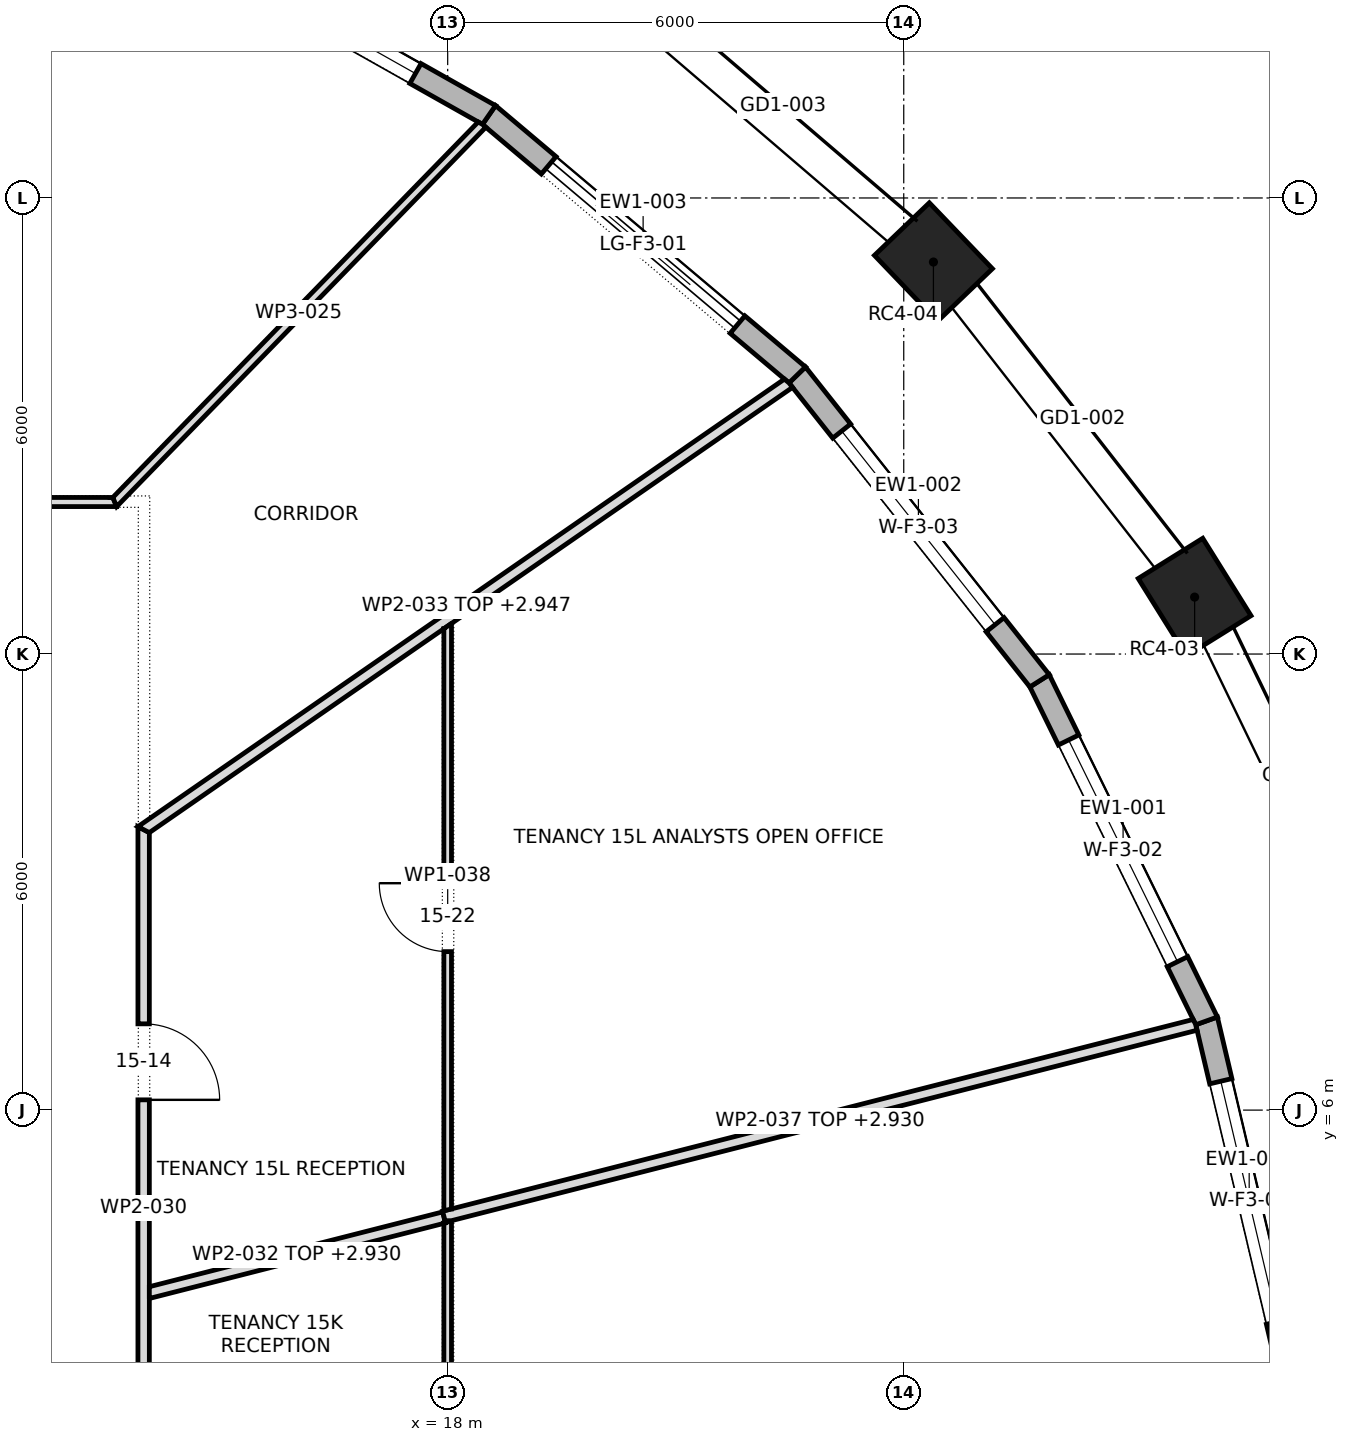
"""IFC4 building model, lengths in metres.
Left out: names, types, materials, properties, quantities, classifications, styles, units other than length and angle.
Written with IfcOpenShell. Run it as: python <this file> out.ifc"""

import sys

from ifc_helpers import new_model, si_unit, direction, frame, frame_2d, origin, origin_2d, place, context, subcontext, project, spatial, polyline, rectangle, outline, extrude, element, fill, save


model = new_model("IFC4")
c1 = context("Model", 3, precision=1e-05, world=origin(), true_north=direction((0.0, 1.0)))
c2 = subcontext(c1, "Body", "Model", "MODEL_VIEW")
j1 = project(units=[si_unit("LENGTHUNIT", "METRE"), si_unit("PLANEANGLEUNIT", "RADIAN")], contexts=[c1])
p1 = place(None, origin())
s1 = spatial("IfcSite", under=j1, at=p1, CompositionType="ELEMENT")
p2 = place(p1, origin())
s2 = spatial("IfcBuilding", under=s1, at=p2, CompositionType="ELEMENT")
p3 = place(p2, frame((0.0, 0.0, 222.9)))
s3 = spatial("IfcBuildingStorey", under=s2, at=p3, CompositionType="ELEMENT", Elevation=222.9)
for number, where, z_axis, x_axis in (
    (1, (27.827, 12.749, 0.0), (0.0, 0.0, 1.0), (-0.529, 0.849, 0.0)),
    (2, (24.39, 17.157, 0.0), (0.0, 0.0, 1.0), (-0.692, 0.722, 0.0)),
):
    element("IfcColumn", number, at=place(p3, frame(where, z_axis=z_axis, x_axis=x_axis)), inside=s3, PredefinedType="COLUMN", context=c2, shape_type="SweptSolid", body=[
        extrude(rectangle(XDim=1.2, YDim=1.0, at=origin_2d()), origin(), (0.0, 0.0, 1.0), 4.0),
    ])
p4 = place(p3, frame((29.104, 2.423, 0.0), z_axis=(0.0, 0.0, 1.0), x_axis=(-0.229546618766, 0.97329766763, 0.0)))
e3 = element("IfcWall", 3, at=p4, inside=s3, PredefinedType="STANDARD", context=c2, shape_type="SweptSolid", body=[
    extrude(outline(polyline([(-0.017, -0.15), (4.899, -0.15), (4.865, 0.15), (0.017, 0.15), (-0.017, -0.15)])), origin(), (0.0, 0.0, 1.0), 3.7),
])
p5 = place(p4, frame((0.816, 0.0, 0.6)))
e4 = element("IfcOpeningElement", 4, at=p5, cuts=e3, PredefinedType="OPENING", context=c2, shape_type="SweptSolid", body=[
    extrude(rectangle(XDim=3.25, YDim=2.65, at=frame_2d((1.625, 1.325))), frame((0.0, 0.162, 0.0), z_axis=(0.0, -1.0, 0.0), x_axis=(1.0, 0.0, 0.0)), (0.0, 0.0, 1.0), 0.324),
])
p6 = place(p3, frame((27.984, 7.174, 0.0), z_axis=(0.0, 0.0, 1.0), x_axis=(-0.440795186599, 0.897607711348, 0.0)))
e5 = element("IfcWall", 5, at=p6, inside=s3, PredefinedType="STANDARD", context=c2, shape_type="SweptSolid", body=[
    extrude(outline(polyline([(-0.017, -0.15), (5.0, -0.15), (4.968, 0.15), (0.017, 0.15), (-0.017, -0.15)])), origin(), (0.0, 0.0, 1.0), 3.7),
])
p7 = place(p6, frame((0.867, 0.0, 0.6)))
e6 = element("IfcOpeningElement", 6, at=p7, cuts=e5, PredefinedType="OPENING", context=c2, shape_type="SweptSolid", body=[
    extrude(rectangle(XDim=3.25, YDim=2.65, at=frame_2d((1.625, 1.325))), frame((0.0, 0.162, 0.0), z_axis=(0.0, -1.0, 0.0), x_axis=(1.0, 0.0, 0.0)), (0.0, 0.0, 1.0), 0.324),
])
p8 = place(p3, frame((25.787, 11.648, 0.0), z_axis=(0.0, 0.0, 1.0), x_axis=(-0.621017151557, 0.783796974651, 0.0)))
e7 = element("IfcWall", 7, at=p8, inside=s3, PredefinedType="STANDARD", context=c2, shape_type="SweptSolid", body=[
    extrude(outline(polyline([(-0.016, -0.15), (5.149, -0.15), (5.119, 0.15), (0.016, 0.15), (-0.016, -0.15)])), origin(), (0.0, 0.0, 1.0), 3.7),
])
p9 = place(p8, frame((0.942, 0.0, 0.6)))
e8 = element("IfcOpeningElement", 8, at=p9, cuts=e7, PredefinedType="OPENING", context=c2, shape_type="SweptSolid", body=[
    extrude(rectangle(XDim=3.25, YDim=2.65, at=frame_2d((1.625, 1.325))), frame((0.0, 0.162, 0.0), z_axis=(0.0, -1.0, 0.0), x_axis=(1.0, 0.0, 0.0)), (0.0, 0.0, 1.0), 0.324),
])
p10 = place(p3, frame((22.599, 15.672, 0.0), z_axis=(0.0, 0.0, 1.0), x_axis=(-0.764397795062, 0.644744919255, 0.0)))
e9 = element("IfcWall", 9, at=p10, inside=s3, PredefinedType="STANDARD", context=c2, shape_type="SweptSolid", body=[
    extrude(outline(polyline([(-0.015, -0.15), (5.319, -0.15), (5.291, 0.15), (0.015, 0.15), (-0.015, -0.15)])), origin(), (0.0, 0.0, 1.0), 3.7),
])
p11 = place(p10, frame((1.028, 0.0, 0.0)))
e10 = element("IfcOpeningElement", 10, at=p11, cuts=e9, PredefinedType="OPENING", context=c2, shape_type="SweptSolid", body=[
    extrude(rectangle(XDim=3.25, YDim=3.25, at=frame_2d((1.625, 1.625))), frame((0.0, 0.162, 0.0), z_axis=(0.0, -1.0, 0.0), x_axis=(1.0, 0.0, 0.0)), (0.0, 0.0, 1.0), 0.324),
])
p12 = place(p3, frame((18.543, 19.092, 0.0), z_axis=(0.0, 0.0, 1.0), x_axis=(-0.871207038577, 0.490915772749, 0.0)))
e11 = element("IfcWall", 11, at=p12, inside=s3, PredefinedType="STANDARD", context=c2, shape_type="SweptSolid", body=[
    extrude(outline(polyline([(-0.014, -0.15), (5.484, -0.15), (5.458, 0.15), (0.014, 0.15), (-0.014, -0.15)])), origin(), (0.0, 0.0, 1.0), 3.7),
])
p13 = place(p12, frame((1.111, 0.0, 0.6)))
e12 = element("IfcOpeningElement", 12, at=p13, cuts=e11, PredefinedType="OPENING", context=c2, shape_type="SweptSolid", body=[
    extrude(rectangle(XDim=3.25, YDim=2.65, at=frame_2d((1.625, 1.325))), frame((0.0, 0.162, 0.0), z_axis=(0.0, -1.0, 0.0), x_axis=(1.0, 0.0, 0.0)), (0.0, 0.0, 1.0), 0.324),
])
p14 = place(p3, frame((1.63, 14.0, 0.0), z_axis=(0.0, 0.0, 1.0), x_axis=(1.0, 0.0, 0.0)))
e13 = element("IfcWall", 13, at=p14, inside=s3, PredefinedType="PARTITIONING", context=c2, shape_type="SweptSolid", body=[
    extrude(outline(polyline([(12.015, -0.06), (12.015, -0.06), (11.965, 0.06), (9.971, 0.06), (7.977, 0.06), (5.982, 0.06), (3.988, 0.06), (1.994, 0.06), (0.0, 0.06), (0.0, -0.06), (1.717, -0.06), (3.433, -0.06), (5.149, -0.06), (6.866, -0.06), (8.583, -0.06), (10.299, -0.06), (12.015, -0.06)])), origin(), (0.0, 0.0, 1.0), 3.7),
])
p15 = place(p14, frame((5.495, 0.0, 0.0)))
e14 = element("IfcOpeningElement", 14, at=p15, cuts=e13, PredefinedType="OPENING", context=c2, shape_type="SweptSolid", body=[
    extrude(rectangle(XDim=1.0, YDim=2.1, at=frame_2d((0.5, 1.05))), frame((0.0, 0.072, 0.0), z_axis=(0.0, -1.0, 0.0), x_axis=(1.0, 0.0, 0.0)), (0.0, 0.0, 1.0), 0.144),
])
p16 = place(p3, frame((13.602, 13.982, 0.0), z_axis=(0.0, 0.0, 1.0), x_axis=(0.697346685185, 0.716733981797, 0.0)))
e15 = element("IfcWall", 15, at=p16, inside=s3, PredefinedType="PARTITIONING", context=c2, shape_type="SweptSolid", body=[
    extrude(outline(polyline([(6.964, -0.06), (6.964, -0.058), (6.96, -0.002), (6.943, 0.06), (5.22, 0.06), (3.497, 0.06), (1.774, 0.06), (0.051, 0.06), (0.051, 0.06), (0.025, 0.0), (0.0, -0.06), (1.741, -0.06), (3.482, -0.06), (5.223, -0.06), (6.964, -0.06)])), origin(), (0.0, 0.0, 1.0), 3.7),
])
p17 = place(p3, frame((14.0, -0.26, 0.0), z_axis=(0.0, 0.0, 1.0), x_axis=(0.0, 1.0, 0.0)))
e16 = element("IfcWall", 16, at=p17, inside=s3, PredefinedType="PARTITIONING", context=c2, shape_type="SweptSolid", body=[
    extrude(outline(polyline([(0.0, -0.075), (1.982, -0.075), (3.964, -0.075), (5.947, -0.075), (7.929, -0.075), (9.911, -0.075), (9.989, 0.075), (9.989, 0.075), (7.991, 0.075), (5.994, 0.075), (3.996, 0.075), (1.998, 0.075), (0.0, 0.075), (0.0, -0.075)])), origin(), (0.0, 0.0, 1.0), 3.7),
])
p18 = place(p17, frame((1.42, 0.0, 0.0)))
e17 = element("IfcOpeningElement", 17, at=p18, cuts=e16, PredefinedType="OPENING", context=c2, shape_type="SweptSolid", body=[
    extrude(rectangle(XDim=1.0, YDim=2.1, at=frame_2d((0.5, 1.05))), frame((0.0, 0.087, 0.0), z_axis=(0.0, -1.0, 0.0), x_axis=(1.0, 0.0, 0.0)), (0.0, 0.0, 1.0), 0.174),
])
p19 = place(p17, frame((6.395, 0.0, 0.0)))
e18 = element("IfcOpeningElement", 18, at=p19, cuts=e16, PredefinedType="OPENING", context=c2, shape_type="SweptSolid", body=[
    extrude(rectangle(XDim=1.0, YDim=2.1, at=frame_2d((0.5, 1.05))), frame((0.0, 0.087, 0.0), z_axis=(0.0, -1.0, 0.0), x_axis=(1.0, 0.0, 0.0)), (0.0, 0.0, 1.0), 0.174),
])
p20 = place(p3, frame((14.057, 3.594, 0.0), z_axis=(0.0, 0.0, 1.0), x_axis=(0.968992302027, 0.247090911634, 0.0)))
e19 = element("IfcWall", 19, at=p20, inside=s3, PredefinedType="PARTITIONING", context=c2, shape_type="SweptSolid", body=[
    extrude(outline(polyline([(0.0, -0.075), (2.0, -0.075), (3.999, -0.075), (3.999, -0.073), (4.005, -0.075), (4.021, -0.075), (4.021, 0.075), (2.029, 0.075), (0.038, 0.075), (0.0, -0.074), (0.0, -0.075)])), origin(), (0.0, 0.0, 1.0), 2.93),
])
p21 = place(p3, frame((13.968, 9.667, 0.0), z_axis=(0.0, 0.0, 1.0), x_axis=(0.822219313141, 0.56917080134, 0.0)))
e20 = element("IfcWall", 20, at=p21, inside=s3, PredefinedType="PARTITIONING", context=c2, shape_type="SweptSolid", body=[
    extrude(outline(polyline([(0.079, -0.075), (1.65, -0.075), (3.22, -0.075), (4.791, -0.075), (4.792, -0.073), (4.795, -0.075), (6.653, -0.075), (8.511, -0.075), (10.37, -0.075), (10.37, -0.066), (10.365, -0.0), (10.345, 0.075), (8.621, 0.075), (6.897, 0.075), (5.173, 0.075), (3.448, 0.075), (1.724, 0.075), (0.0, 0.075), (0.039, 0.0), (0.079, -0.075)])), origin(), (0.0, 0.0, 1.0), 2.947),
])
p22 = place(p3, frame((18.0, -4.535, 0.0), z_axis=(0.0, 0.0, 1.0), x_axis=(0.0, 1.0, 0.0)))
e21 = element("IfcWall", 21, at=p22, inside=s3, PredefinedType="PARTITIONING", context=c2, shape_type="SweptSolid", body=[
    extrude(outline(polyline([(9.08, -0.05), (9.08, -0.048), (9.06, 0.03), (9.08, 0.035), (9.08, 0.036), (9.05, 0.029), (9.045, 0.05), (7.471, 0.05), (5.898, 0.05), (4.325, 0.05), (4.325, 0.05), (4.225, 0.05), (4.225, 0.05), (2.825, 0.05), (1.425, 0.05), (0.025, 0.05), (0.0, -0.048), (0.0, -0.05), (1.816, -0.05), (3.632, -0.05), (5.448, -0.05), (7.264, -0.05), (9.08, -0.05)])), origin(), (0.0, 0.0, 1.0), 3.7),
])
p23 = place(p22, frame((6.255, 0.0, 0.0)))
e22 = element("IfcOpeningElement", 22, at=p23, cuts=e21, PredefinedType="OPENING", context=c2, shape_type="SweptSolid", body=[
    extrude(rectangle(XDim=0.9, YDim=2.1, at=frame_2d((0.45, 1.05))), frame((0.0, 0.062, 0.0), z_axis=(0.0, -1.0, 0.0), x_axis=(1.0, 0.0, 0.0)), (0.0, 0.0, 1.0), 0.124),
])
p24 = place(p3, frame((17.952, 4.598, 0.0), z_axis=(0.0, 0.0, 1.0), x_axis=(0.968895869382, 0.247468774381, 0.0)))
e23 = element("IfcWall", 23, at=p24, inside=s3, PredefinedType="PARTITIONING", context=c2, shape_type="SweptSolid", body=[
    extrude(outline(polyline([(10.206, -0.075), (10.206, 0.008), (10.192, 0.075), (8.513, 0.075), (6.835, 0.075), (5.156, 0.075), (3.478, 0.075), (1.799, 0.075), (0.121, 0.075), (0.121, 0.075), (0.12, 0.075), (0.0, 0.075), (0.0, -0.054), (0.081, -0.075), (1.768, -0.075), (3.456, -0.075), (5.143, -0.075), (6.831, -0.075), (8.518, -0.075), (10.206, -0.075)])), origin(), (0.0, 0.0, 1.0), 2.93),
])
p25 = place(p3, frame((18.0, 12.402, 0.0), z_axis=(0.0, 0.0, 1.0), x_axis=(0.0, -1.0, 0.0)))
e24 = element("IfcWall", 24, at=p25, inside=s3, PredefinedType="PARTITIONING", context=c2, shape_type="SweptSolid", body=[
    extrude(outline(polyline([(7.727, -0.05), (7.727, -0.048), (7.702, 0.05), (5.776, 0.05), (3.851, 0.05), (1.926, 0.05), (0.0, 0.05), (0.0, 0.05), (0.069, -0.05), (1.984, -0.05), (3.898, -0.05), (5.812, -0.05), (7.727, -0.05)])), origin(), (0.0, 0.0, 1.0), 3.7),
])
p26 = place(p25, frame((3.417, 0.0, 0.0)))
e25 = element("IfcOpeningElement", 25, at=p26, cuts=e24, PredefinedType="OPENING", context=c2, shape_type="SweptSolid", body=[
    extrude(rectangle(XDim=0.9, YDim=2.1, at=frame_2d((0.45, 1.05))), frame((0.0, 0.062, 0.0), z_axis=(0.0, -1.0, 0.0), x_axis=(1.0, 0.0, 0.0)), (0.0, 0.0, 1.0), 0.124),
])
p27 = place(p5, origin())
e26 = element("IfcWindow", 26, at=p27, inside=s3, PartitioningType="TRIPLE_PANEL_VERTICAL", PredefinedType="WINDOW", context=c2, shape_type="SweptSolid", body=[
    extrude(rectangle(XDim=3.25, YDim=2.65, at=frame_2d((1.625, 1.325))), frame((0.0, 0.03, 0.0), z_axis=(0.0, -1.0, 0.0), x_axis=(1.0, 0.0, 0.0)), (0.0, 0.0, 1.0), 0.06),
])
fill(e4, e26)
p28 = place(p7, origin())
e27 = element("IfcWindow", 27, at=p28, inside=s3, PartitioningType="TRIPLE_PANEL_VERTICAL", PredefinedType="WINDOW", context=c2, shape_type="SweptSolid", body=[
    extrude(rectangle(XDim=3.25, YDim=2.65, at=frame_2d((1.625, 1.325))), frame((0.0, 0.03, 0.0), z_axis=(0.0, -1.0, 0.0), x_axis=(1.0, 0.0, 0.0)), (0.0, 0.0, 1.0), 0.06),
])
fill(e6, e27)
p29 = place(p9, origin())
e28 = element("IfcWindow", 28, at=p29, inside=s3, PartitioningType="TRIPLE_PANEL_VERTICAL", PredefinedType="WINDOW", context=c2, shape_type="SweptSolid", body=[
    extrude(rectangle(XDim=3.25, YDim=2.65, at=frame_2d((1.625, 1.325))), frame((0.0, 0.03, 0.0), z_axis=(0.0, -1.0, 0.0), x_axis=(1.0, 0.0, 0.0)), (0.0, 0.0, 1.0), 0.06),
])
fill(e8, e28)
p30 = place(p11, origin())
e29 = element("IfcDoor", 29, at=p30, inside=s3, OperationType="DOUBLE_DOOR_SLIDING", PredefinedType="DOOR", context=c2, shape_type="SweptSolid", body=[
    extrude(rectangle(XDim=3.25, YDim=3.25, at=frame_2d((1.625, 1.625))), frame((0.0, 0.025, 0.0), z_axis=(0.0, -1.0, 0.0), x_axis=(1.0, 0.0, 0.0)), (0.0, 0.0, 1.0), 0.05),
])
fill(e10, e29)
p31 = place(p13, origin())
e30 = element("IfcWindow", 30, at=p31, inside=s3, PartitioningType="TRIPLE_PANEL_VERTICAL", PredefinedType="WINDOW", context=c2, shape_type="SweptSolid", body=[
    extrude(rectangle(XDim=3.25, YDim=2.65, at=frame_2d((1.625, 1.325))), frame((0.0, 0.03, 0.0), z_axis=(0.0, -1.0, 0.0), x_axis=(1.0, 0.0, 0.0)), (0.0, 0.0, 1.0), 0.06),
])
fill(e12, e30)
p32 = place(p19, frame((1.0, 0.0, 0.0), z_axis=(0.0, 0.0, 1.0), x_axis=(-1.0, 0.0, 0.0)))
e31 = element("IfcDoor", 31, at=p32, inside=s3, OperationType="SINGLE_SWING_LEFT", PredefinedType="DOOR", context=c2, shape_type="SweptSolid", body=[
    extrude(rectangle(XDim=1.0, YDim=2.1, at=frame_2d((0.5, 1.05))), frame((0.0, 0.025, 0.0), z_axis=(0.0, -1.0, 0.0), x_axis=(1.0, 0.0, 0.0)), (0.0, 0.0, 1.0), 0.05),
])
fill(e18, e31)
p33 = place(p26, frame((0.9, 0.0, 0.0), z_axis=(0.0, 0.0, 1.0), x_axis=(-1.0, 0.0, 0.0)))
e32 = element("IfcDoor", 32, at=p33, inside=s3, OperationType="SINGLE_SWING_LEFT", PredefinedType="DOOR", context=c2, shape_type="SweptSolid", body=[
    extrude(rectangle(XDim=0.9, YDim=2.1, at=frame_2d((0.45, 1.05))), frame((0.0, 0.025, 0.0), z_axis=(0.0, -1.0, 0.0), x_axis=(1.0, 0.0, 0.0)), (0.0, 0.0, 1.0), 0.05),
])
fill(e25, e32)
save(model, sys.argv[1])
